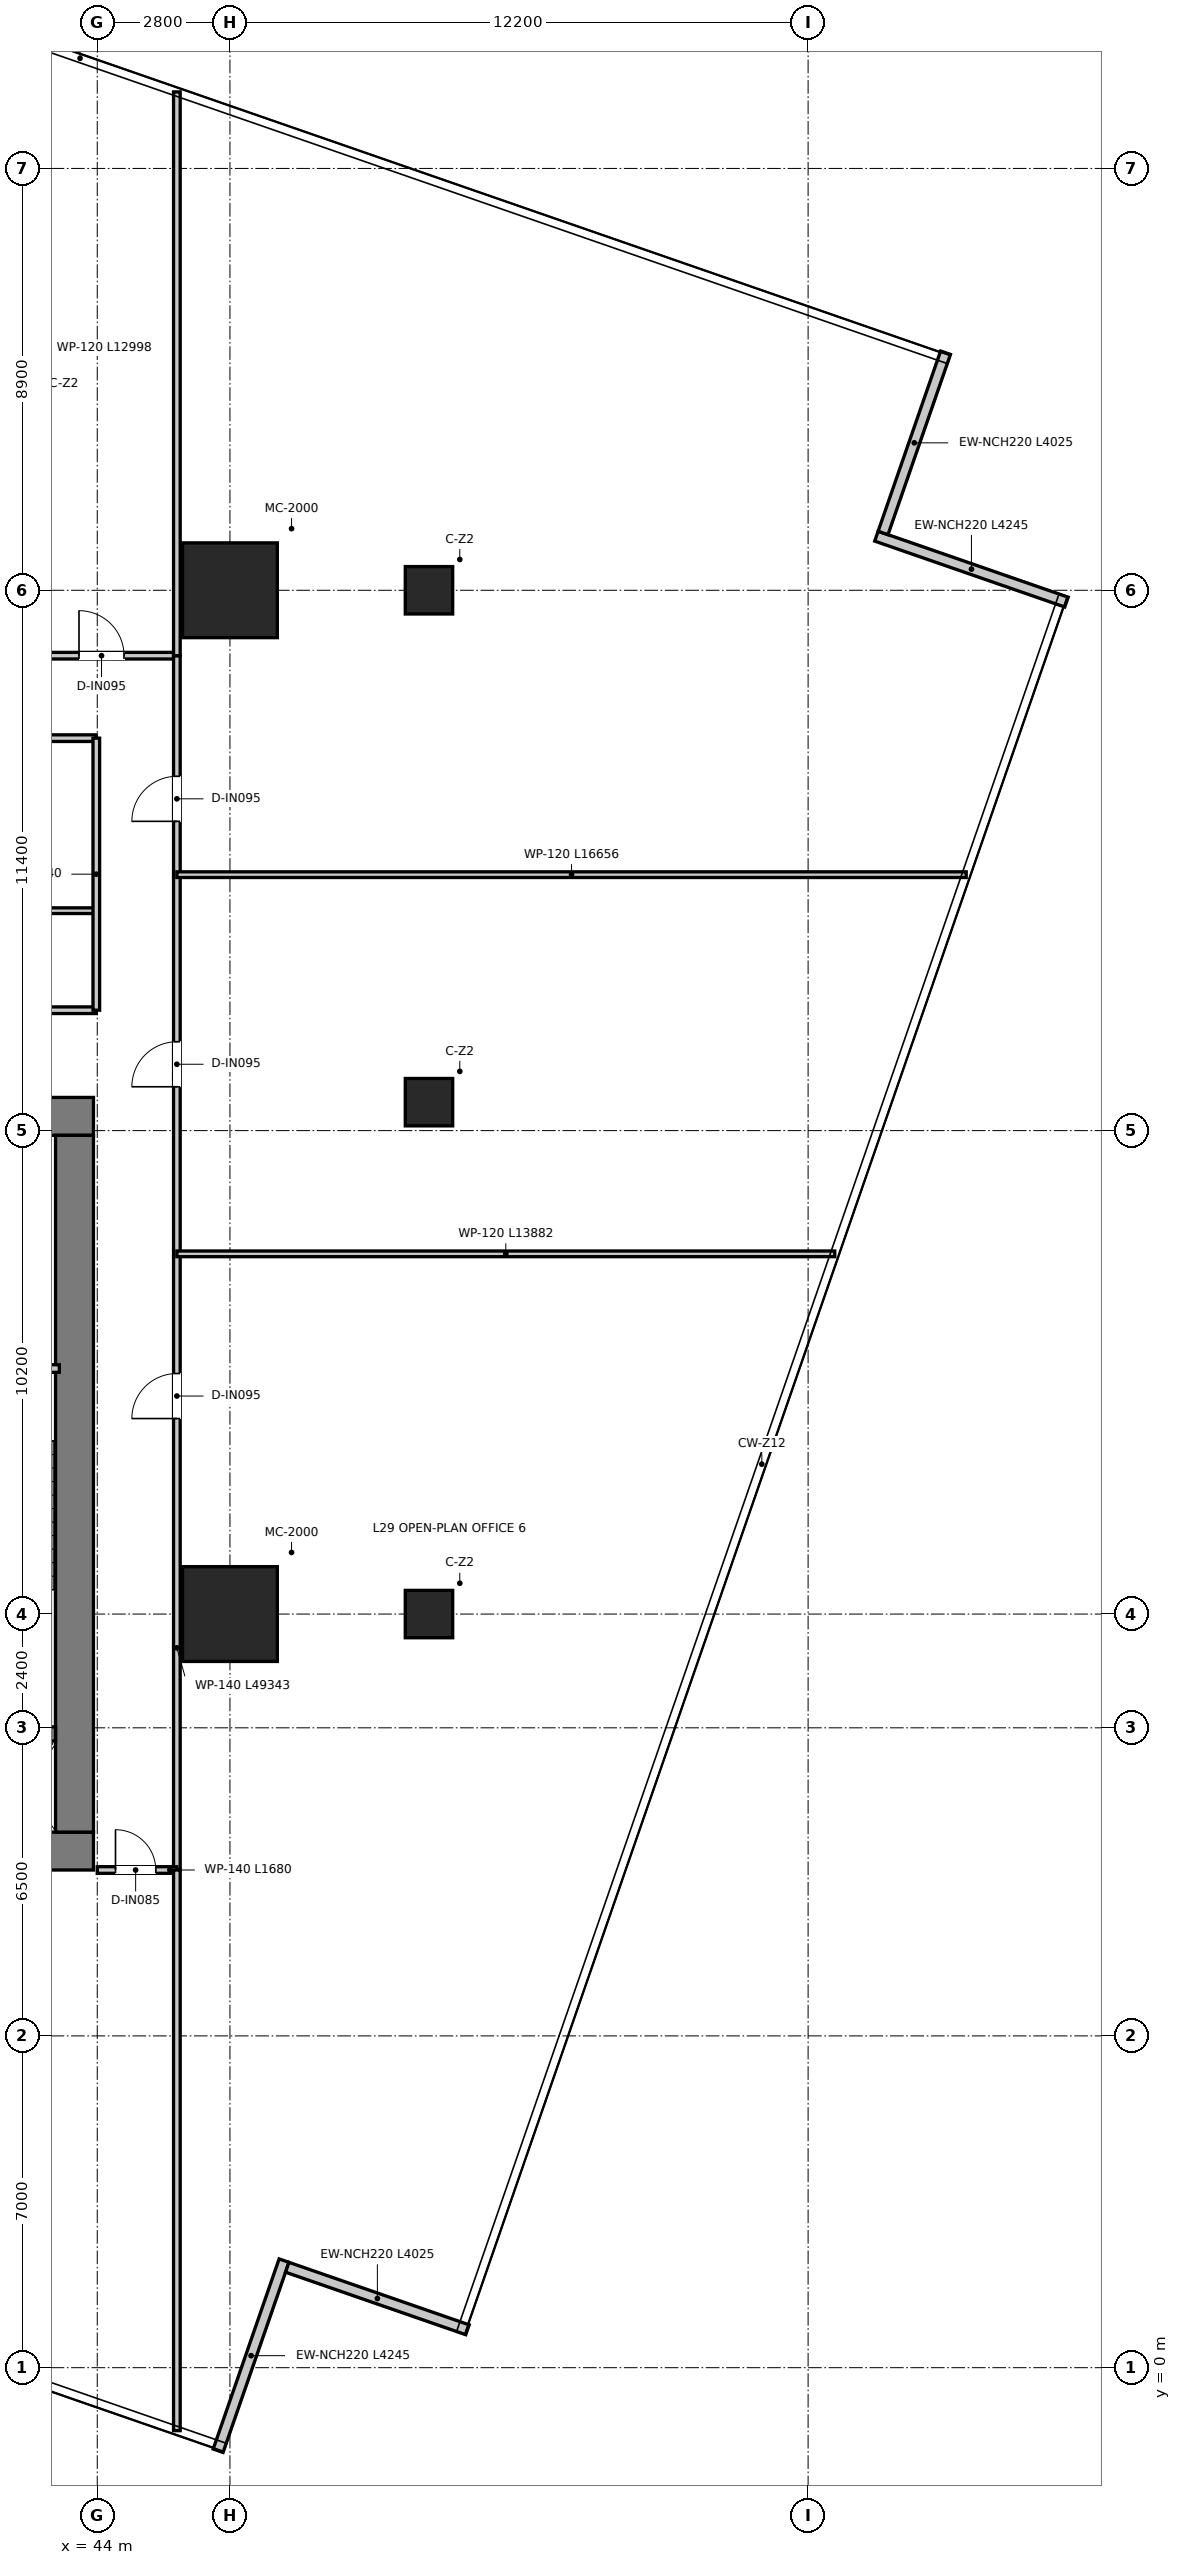
"""IFC4 building model, lengths in metres.
Left out: names, types, materials, properties, quantities, classifications, styles, units other than length and angle.
Written with IfcOpenShell. Run it as: python <this file> out.ifc"""

import sys

from ifc_helpers import new_model, si_unit, direction, frame, frame_2d, origin, origin_2d, place, context, subcontext, project, spatial, rectangle, extrude, source, transform, mapped, element, fill, save


model = new_model("IFC4")
c1 = context("Model", 3, precision=1e-05, world=origin(), true_north=direction((0.0, 1.0)))
c2 = subcontext(c1, "Body", "Model", "MODEL_VIEW")
j1 = project(units=[si_unit("LENGTHUNIT", "METRE"), si_unit("PLANEANGLEUNIT", "RADIAN")], contexts=[c1])
p1 = place(None, origin())
s1 = spatial("IfcSite", under=j1, at=p1, CompositionType="ELEMENT")
p2 = place(p1, origin())
s2 = spatial("IfcBuilding", under=s1, at=p2, CompositionType="ELEMENT")
p3 = place(p2, frame((0.0, 0.0, 121.65)))
s3 = spatial("IfcBuildingStorey", under=s2, at=p3, CompositionType="ELEMENT", Elevation=121.65)
p4 = place(p3, frame((28.08, 10.9, 0.0), z_axis=(0.0, 0.0, 1.0), x_axis=(1.0, 0.0, 0.0)))
e1 = element("IfcWall", 1, at=p4, inside=s3, PredefinedType="SHEAR", context=c2, shape_type="SweptSolid", body=[
    extrude(rectangle(XDim=15.84, YDim=0.8, at=frame_2d((7.92, 0.0))), origin(), (0.0, 0.0, 1.0), 3.95),
])
p5 = place(p3, frame((28.08, 26.4, 0.0), z_axis=(0.0, 0.0, 1.0), x_axis=(1.0, 0.0, 0.0)))
e2 = element("IfcWall", 2, at=p5, inside=s3, PredefinedType="SHEAR", context=c2, shape_type="SweptSolid", body=[
    extrude(rectangle(XDim=15.84, YDim=0.8, at=frame_2d((7.92, 0.0))), origin(), (0.0, 0.0, 1.0), 3.95),
])
p6 = place(p5, frame((7.22, 0.0, 0.0)))
e3 = element("IfcOpeningElement", 3, at=p6, cuts=e2, PredefinedType="OPENING", context=c2, shape_type="SweptSolid", body=[
    extrude(rectangle(XDim=1.4, YDim=2.2, at=frame_2d((0.7, 1.1))), frame((0.0, 0.41, 0.0), z_axis=(0.0, -1.0, 0.0), x_axis=(1.0, 0.0, 0.0)), (0.0, 0.0, 1.0), 0.82),
])
p7 = place(p5, frame((1.775, 0.0, 0.0)))
e4 = element("IfcOpeningElement", 4, at=p7, cuts=e2, PredefinedType="OPENING", context=c2, shape_type="SweptSolid", body=[
    extrude(rectangle(XDim=1.05, YDim=2.1, at=frame_2d((0.525, 1.05))), frame((0.0, 0.41, 0.0), z_axis=(0.0, -1.0, 0.0), x_axis=(1.0, 0.0, 0.0)), (0.0, 0.0, 1.0), 0.82),
])
p8 = place(p5, frame((13.015, 0.0, 0.0)))
e5 = element("IfcOpeningElement", 5, at=p8, cuts=e2, PredefinedType="OPENING", context=c2, shape_type="SweptSolid", body=[
    extrude(rectangle(XDim=1.05, YDim=2.1, at=frame_2d((0.525, 1.05))), frame((0.0, 0.41, 0.0), z_axis=(0.0, -1.0, 0.0), x_axis=(1.0, 0.0, 0.0)), (0.0, 0.0, 1.0), 0.82),
])
p9 = place(p3, frame((43.52, 11.3, 0.0), z_axis=(0.0, 0.0, 1.0), x_axis=(0.0, 1.0, 0.0)))
e6 = element("IfcWall", 6, at=p9, inside=s3, PredefinedType="SHEAR", context=c2, shape_type="SweptSolid", body=[
    extrude(rectangle(XDim=14.7, YDim=0.8, at=frame_2d((7.35, 0.0))), origin(), (0.0, 0.0, 1.0), 3.95),
])
p10 = place(p3, frame((40.02, 13.37, 0.0), z_axis=(0.0, 0.0, 1.0), x_axis=(1.0, 0.0, 0.0)))
e7 = element("IfcWall", 7, at=p10, inside=s3, PredefinedType="SHEAR", context=c2, shape_type="SweptSolid", body=[
    extrude(rectangle(XDim=3.1, YDim=0.3, at=frame_2d((1.55, 0.0))), origin(), (0.0, 0.0, 1.0), 3.95),
])
m1 = source(origin(), c2, "Body", "SweptSolid", [
    extrude(rectangle(XDim=2.0, YDim=2.0, at=origin_2d()), origin(), (0.0, 0.0, 1.0), 3.95),
])
for number, where, z_axis, x_axis in (
    (8, (46.8, 15.9, 0.0), (0.0, 0.0, 1.0), (1.0, 0.0, 0.0)),
    (9, (46.8, 37.5, 0.0), (0.0, 0.0, 1.0), (1.0, 0.0, 0.0)),
):
    element("IfcColumn", number, at=place(p3, frame(where, z_axis=z_axis, x_axis=x_axis)), inside=s3, PredefinedType="USERDEFINED", context=c2, shape_type="MappedRepresentation", body=[
        mapped(m1, transform((0.0, 0.0, 0.0), x_axis=(1.0, 0.0, 0.0), y_axis=(0.0, 1.0, 0.0), z_axis=(0.0, 0.0, 1.0), scale=1.0)),
    ])
m2 = source(origin(), c2, "Body", "SweptSolid", [
    extrude(rectangle(XDim=1.0, YDim=1.0, at=origin_2d()), origin(), (0.0, 0.0, 1.0), 3.95),
])
for number, where, z_axis, x_axis in (
    (10, (51.0, 37.5, 0.0), (0.0, 0.0, 1.0), (1.0, 0.0, 0.0)),
    (11, (51.0, 26.7, 0.0), (0.0, 0.0, 1.0), (1.0, 0.0, 0.0)),
    (12, (51.0, 15.9, 0.0), (0.0, 0.0, 1.0), (1.0, 0.0, 0.0)),
):
    element("IfcColumn", number, at=place(p3, frame(where, z_axis=z_axis, x_axis=x_axis)), inside=s3, PredefinedType="COLUMN", context=c2, shape_type="MappedRepresentation", body=[
        mapped(m2, transform((0.0, 0.0, 0.0), x_axis=(1.0, 0.0, 0.0), y_axis=(0.0, 1.0, 0.0), z_axis=(0.0, 0.0, 1.0), scale=1.0)),
    ])
p11 = place(p3, frame((46.551, -1.752, 0.0), z_axis=(0.0, 0.0, 1.0), x_axis=(0.327661647146, 0.944795133873, 0.0)))
e13 = element("IfcWall", 13, at=p11, inside=s3, PredefinedType="ELEMENTEDWALL", context=c2, shape_type="SweptSolid", body=[
    extrude(rectangle(XDim=4.245, YDim=0.22, at=frame_2d((2.123, 0.0))), origin(), (0.0, 0.0, 1.0), 3.67),
])
p12 = place(p3, frame((48.009, 2.119, 0.0), z_axis=(0.0, 0.0, 1.0), x_axis=(0.944811416539, -0.327614693164, 0.0)))
e14 = element("IfcWall", 14, at=p12, inside=s3, PredefinedType="ELEMENTEDWALL", context=c2, shape_type="SweptSolid", body=[
    extrude(rectangle(XDim=4.025, YDim=0.22, at=frame_2d((2.012, 0.0))), origin(), (0.0, 0.0, 1.0), 3.67),
])
p13 = place(p3, frame((64.452, 37.25, 0.0), z_axis=(0.0, 0.0, 1.0), x_axis=(-0.944801308279, 0.327643843028, 0.0)))
e15 = element("IfcWall", 15, at=p13, inside=s3, PredefinedType="ELEMENTEDWALL", context=c2, shape_type="SweptSolid", body=[
    extrude(rectangle(XDim=4.245, YDim=0.22, at=frame_2d((2.123, 0.0))), origin(), (0.0, 0.0, 1.0), 3.67),
])
p14 = place(p3, frame((60.581, 38.709, 0.0), z_axis=(0.0, 0.0, 1.0), x_axis=(0.327650062068, 0.94479915158, 0.0)))
e16 = element("IfcWall", 16, at=p14, inside=s3, PredefinedType="ELEMENTEDWALL", context=c2, shape_type="SweptSolid", body=[
    extrude(rectangle(XDim=4.025, YDim=0.22, at=frame_2d((2.013, 0.0))), origin(), (0.0, 0.0, 1.0), 3.67),
])
p15 = place(p3, frame((40.04, 21.08, 0.0), z_axis=(0.0, 0.0, 1.0), x_axis=(1.0, 0.0, 0.0)))
e17 = element("IfcWall", 17, at=p15, inside=s3, PredefinedType="PARTITIONING", context=c2, shape_type="SweptSolid", body=[
    extrude(rectangle(XDim=3.16, YDim=0.16, at=frame_2d((1.58, 0.0))), origin(), (0.0, 0.0, 1.0), 3.67),
])
p16 = place(p15, frame((1.055, 0.0, 0.0)))
e18 = element("IfcOpeningElement", 18, at=p16, cuts=e17, PredefinedType="OPENING", context=c2, shape_type="SweptSolid", body=[
    extrude(rectangle(XDim=1.05, YDim=2.1, at=frame_2d((0.525, 1.05))), frame((0.0, 0.09, 0.0), z_axis=(0.0, -1.0, 0.0), x_axis=(1.0, 0.0, 0.0)), (0.0, 0.0, 1.0), 0.18),
])
p17 = place(p3, frame((28.02, 28.64, 0.0), z_axis=(0.0, 0.0, 1.0), x_axis=(1.0, 0.0, 0.0)))
e19 = element("IfcWall", 19, at=p17, inside=s3, PredefinedType="PARTITIONING", context=c2, shape_type="SweptSolid", body=[
    extrude(rectangle(XDim=15.96, YDim=0.14, at=frame_2d((7.98, 0.0))), origin(), (0.0, 0.0, 1.0), 3.08),
])
p18 = place(p17, frame((7.455, 0.0, 0.0)))
e20 = element("IfcOpeningElement", 20, at=p18, cuts=e19, PredefinedType="OPENING", context=c2, shape_type="SweptSolid", body=[
    extrude(rectangle(XDim=1.05, YDim=2.15, at=frame_2d((0.525, 1.075))), frame((0.0, 0.08, 0.0), z_axis=(0.0, -1.0, 0.0), x_axis=(1.0, 0.0, 0.0)), (0.0, 0.0, 1.0), 0.16),
])
p19 = place(p3, frame((28.02, 30.74, 0.0), z_axis=(0.0, 0.0, 1.0), x_axis=(1.0, 0.0, 0.0)))
e21 = element("IfcWall", 21, at=p19, inside=s3, PredefinedType="PARTITIONING", context=c2, shape_type="SweptSolid", body=[
    extrude(rectangle(XDim=15.96, YDim=0.12, at=frame_2d((7.98, 0.0))), origin(), (0.0, 0.0, 1.0), 3.08),
])
p20 = place(p3, frame((28.02, 34.38, 0.0), z_axis=(0.0, 0.0, 1.0), x_axis=(1.0, 0.0, 0.0)))
e22 = element("IfcWall", 22, at=p20, inside=s3, PredefinedType="PARTITIONING", context=c2, shape_type="SweptSolid", body=[
    extrude(rectangle(XDim=15.96, YDim=0.14, at=frame_2d((7.98, 0.0))), origin(), (0.0, 0.0, 1.0), 3.08),
])
p21 = place(p20, frame((1.13, 0.0, 0.0)))
e23 = element("IfcOpeningElement", 23, at=p21, cuts=e22, PredefinedType="OPENING", context=c2, shape_type="SweptSolid", body=[
    extrude(rectangle(XDim=0.9, YDim=2.1, at=frame_2d((0.45, 1.05))), frame((0.0, 0.08, 0.0), z_axis=(0.0, -1.0, 0.0), x_axis=(1.0, 0.0, 0.0)), (0.0, 0.0, 1.0), 0.16),
])
p22 = place(p20, frame((4.33, 0.0, 0.0)))
e24 = element("IfcOpeningElement", 24, at=p22, cuts=e22, PredefinedType="OPENING", context=c2, shape_type="SweptSolid", body=[
    extrude(rectangle(XDim=0.9, YDim=2.1, at=frame_2d((0.45, 1.05))), frame((0.0, 0.08, 0.0), z_axis=(0.0, -1.0, 0.0), x_axis=(1.0, 0.0, 0.0)), (0.0, 0.0, 1.0), 0.16),
])
p23 = place(p20, frame((7.355, 0.0, 0.0)))
e25 = element("IfcOpeningElement", 25, at=p23, cuts=e22, PredefinedType="OPENING", context=c2, shape_type="SweptSolid", body=[
    extrude(rectangle(XDim=0.95, YDim=2.1, at=frame_2d((0.475, 1.05))), frame((0.0, 0.08, 0.0), z_axis=(0.0, -1.0, 0.0), x_axis=(1.0, 0.0, 0.0)), (0.0, 0.0, 1.0), 0.16),
])
p24 = place(p20, frame((12.23, 0.0, 0.0)))
e26 = element("IfcOpeningElement", 26, at=p24, cuts=e22, PredefinedType="OPENING", context=c2, shape_type="SweptSolid", body=[
    extrude(rectangle(XDim=0.95, YDim=2.1, at=frame_2d((0.475, 1.05))), frame((0.0, 0.08, 0.0), z_axis=(0.0, -1.0, 0.0), x_axis=(1.0, 0.0, 0.0)), (0.0, 0.0, 1.0), 0.16),
])
p25 = place(p3, frame((43.98, 28.64, 0.0), z_axis=(0.0, 0.0, 1.0), x_axis=(0.0, 1.0, 0.0)))
e27 = element("IfcWall", 27, at=p25, inside=s3, PredefinedType="PARTITIONING", context=c2, shape_type="SweptSolid", body=[
    extrude(rectangle(XDim=5.74, YDim=0.14, at=frame_2d((2.87, 0.0))), origin(), (0.0, 0.0, 1.0), 3.27),
])
p26 = place(p3, frame((26.32, 36.12, 0.0), z_axis=(0.0, 0.0, 1.0), x_axis=(1.0, 0.0, 0.0)))
e28 = element("IfcWall", 28, at=p26, inside=s3, PredefinedType="PARTITIONING", context=c2, shape_type="SweptSolid", body=[
    extrude(rectangle(XDim=19.36, YDim=0.14, at=frame_2d((9.68, 0.0))), origin(), (0.0, 0.0, 1.0), 3.08),
])
p27 = place(p26, frame((1.615, 0.0, 0.0)))
e29 = element("IfcOpeningElement", 29, at=p27, cuts=e28, PredefinedType="OPENING", context=c2, shape_type="SweptSolid", body=[
    extrude(rectangle(XDim=0.95, YDim=2.1, at=frame_2d((0.475, 1.05))), frame((0.0, 0.08, 0.0), z_axis=(0.0, -1.0, 0.0), x_axis=(1.0, 0.0, 0.0)), (0.0, 0.0, 1.0), 0.16),
])
p28 = place(p26, frame((6.705, 0.0, 0.0)))
e30 = element("IfcOpeningElement", 30, at=p28, cuts=e28, PredefinedType="OPENING", context=c2, shape_type="SweptSolid", body=[
    extrude(rectangle(XDim=0.95, YDim=2.1, at=frame_2d((0.475, 1.05))), frame((0.0, 0.08, 0.0), z_axis=(0.0, -1.0, 0.0), x_axis=(1.0, 0.0, 0.0)), (0.0, 0.0, 1.0), 0.16),
])
p29 = place(p26, frame((12.705, 0.0, 0.0)))
e31 = element("IfcOpeningElement", 31, at=p29, cuts=e28, PredefinedType="OPENING", context=c2, shape_type="SweptSolid", body=[
    extrude(rectangle(XDim=0.95, YDim=2.1, at=frame_2d((0.475, 1.05))), frame((0.0, 0.08, 0.0), z_axis=(0.0, -1.0, 0.0), x_axis=(1.0, 0.0, 0.0)), (0.0, 0.0, 1.0), 0.16),
])
p30 = place(p26, frame((17.295, 0.0, 0.0)))
e32 = element("IfcOpeningElement", 32, at=p30, cuts=e28, PredefinedType="OPENING", context=c2, shape_type="SweptSolid", body=[
    extrude(rectangle(XDim=0.95, YDim=2.1, at=frame_2d((0.475, 1.05))), frame((0.0, 0.08, 0.0), z_axis=(0.0, -1.0, 0.0), x_axis=(1.0, 0.0, 0.0)), (0.0, 0.0, 1.0), 0.16),
])
p31 = place(p3, frame((45.68, 10.5, 0.0), z_axis=(0.0, 0.0, 1.0), x_axis=(0.0, 1.0, 0.0)))
e33 = element("IfcWall", 33, at=p31, inside=s3, PredefinedType="PARTITIONING", context=c2, shape_type="SweptSolid", body=[
    extrude(rectangle(XDim=25.62, YDim=0.14, at=frame_2d((12.81, 0.0))), origin(), (0.0, 0.0, 1.0), 2.97),
])
p32 = place(p31, frame((9.525, 0.0, 0.0)))
e34 = element("IfcOpeningElement", 34, at=p32, cuts=e33, PredefinedType="OPENING", context=c2, shape_type="SweptSolid", body=[
    extrude(rectangle(XDim=0.95, YDim=2.1, at=frame_2d((0.475, 1.05))), frame((0.0, 0.08, 0.0), z_axis=(0.0, -1.0, 0.0), x_axis=(1.0, 0.0, 0.0)), (0.0, 0.0, 1.0), 0.16),
])
p33 = place(p31, frame((16.525, 0.0, 0.0)))
e35 = element("IfcOpeningElement", 35, at=p33, cuts=e33, PredefinedType="OPENING", context=c2, shape_type="SweptSolid", body=[
    extrude(rectangle(XDim=0.95, YDim=2.1, at=frame_2d((0.475, 1.05))), frame((0.0, 0.08, 0.0), z_axis=(0.0, -1.0, 0.0), x_axis=(1.0, 0.0, 0.0)), (0.0, 0.0, 1.0), 0.16),
])
p34 = place(p31, frame((22.125, 0.0, 0.0)))
e36 = element("IfcOpeningElement", 36, at=p34, cuts=e33, PredefinedType="OPENING", context=c2, shape_type="SweptSolid", body=[
    extrude(rectangle(XDim=0.95, YDim=2.1, at=frame_2d((0.475, 1.05))), frame((0.0, 0.08, 0.0), z_axis=(0.0, -1.0, 0.0), x_axis=(1.0, 0.0, 0.0)), (0.0, 0.0, 1.0), 0.16),
])
p35 = place(p3, frame((44.0, 10.5, 0.0), z_axis=(0.0, 0.0, 1.0), x_axis=(1.0, 0.0, 0.0)))
e37 = element("IfcWall", 37, at=p35, inside=s3, PredefinedType="PARTITIONING", context=c2, shape_type="SweptSolid", body=[
    extrude(rectangle(XDim=1.68, YDim=0.14, at=frame_2d((0.84, 0.0))), origin(), (0.0, 0.0, 1.0), 3.67),
])
p36 = place(p35, frame((0.385, 0.0, 0.0)))
e38 = element("IfcOpeningElement", 38, at=p36, cuts=e37, PredefinedType="OPENING", context=c2, shape_type="SweptSolid", body=[
    extrude(rectangle(XDim=0.85, YDim=2.1, at=frame_2d((0.425, 1.05))), frame((0.0, 0.08, 0.0), z_axis=(0.0, -1.0, 0.0), x_axis=(1.0, 0.0, 0.0)), (0.0, 0.0, 1.0), 0.16),
])
p37 = place(p3, frame((45.68, 36.12, 0.0), z_axis=(0.0, 0.0, 1.0), x_axis=(0.0, 1.0, 0.0)))
e39 = element("IfcWall", 39, at=p37, inside=s3, PredefinedType="PARTITIONING", context=c2, shape_type="SweptSolid", body=[
    extrude(rectangle(XDim=11.895, YDim=0.14, at=frame_2d((5.947, 0.0))), origin(), (0.0, 0.0, 1.0), 2.97),
])
p38 = place(p3, frame((45.68, -1.329, 0.0), z_axis=(0.0, 0.0, 1.0), x_axis=(0.0, 1.0, 0.0)))
e40 = element("IfcWall", 40, at=p38, inside=s3, PredefinedType="PARTITIONING", context=c2, shape_type="SweptSolid", body=[
    extrude(rectangle(XDim=11.829, YDim=0.14, at=frame_2d((5.914, 0.0))), origin(), (0.0, 0.0, 1.0), 3.67),
])
p39 = place(p3, frame((45.68, 23.5, 0.0), z_axis=(0.0, 0.0, 1.0), x_axis=(1.0, 0.0, 0.0)))
e41 = element("IfcWall", 41, at=p39, inside=s3, PredefinedType="PARTITIONING", context=c2, shape_type="SweptSolid", body=[
    extrude(rectangle(XDim=13.882, YDim=0.12, at=frame_2d((6.941, 0.0))), origin(), (0.0, 0.0, 1.0), 2.97),
])
p40 = place(p3, frame((45.68, 31.5, 0.0), z_axis=(0.0, 0.0, 1.0), x_axis=(1.0, 0.0, 0.0)))
e42 = element("IfcWall", 42, at=p40, inside=s3, PredefinedType="PARTITIONING", context=c2, shape_type="SweptSolid", body=[
    extrude(rectangle(XDim=16.656, YDim=0.12, at=frame_2d((8.328, 0.0))), origin(), (0.0, 0.0, 1.0), 2.97),
])
p41 = place(p30, origin())
e43 = element("IfcDoor", 43, at=p41, inside=s3, OperationType="SINGLE_SWING_LEFT", PredefinedType="DOOR", context=c2, shape_type="SweptSolid", body=[
    extrude(rectangle(XDim=0.95, YDim=2.1, at=frame_2d((0.475, 1.05))), frame((0.0, 0.025, 0.0), z_axis=(0.0, -1.0, 0.0), x_axis=(1.0, 0.0, 0.0)), (0.0, 0.0, 1.0), 0.05),
])
fill(e32, e43)
p42 = place(p32, origin())
e44 = element("IfcDoor", 44, at=p42, inside=s3, OperationType="SINGLE_SWING_LEFT", PredefinedType="DOOR", context=c2, shape_type="SweptSolid", body=[
    extrude(rectangle(XDim=0.95, YDim=2.1, at=frame_2d((0.475, 1.05))), frame((0.0, 0.025, 0.0), z_axis=(0.0, -1.0, 0.0), x_axis=(1.0, 0.0, 0.0)), (0.0, 0.0, 1.0), 0.05),
])
fill(e34, e44)
p43 = place(p33, origin())
e45 = element("IfcDoor", 45, at=p43, inside=s3, OperationType="SINGLE_SWING_LEFT", PredefinedType="DOOR", context=c2, shape_type="SweptSolid", body=[
    extrude(rectangle(XDim=0.95, YDim=2.1, at=frame_2d((0.475, 1.05))), frame((0.0, 0.025, 0.0), z_axis=(0.0, -1.0, 0.0), x_axis=(1.0, 0.0, 0.0)), (0.0, 0.0, 1.0), 0.05),
])
fill(e35, e45)
p44 = place(p34, origin())
e46 = element("IfcDoor", 46, at=p44, inside=s3, OperationType="SINGLE_SWING_LEFT", PredefinedType="DOOR", context=c2, shape_type="SweptSolid", body=[
    extrude(rectangle(XDim=0.95, YDim=2.1, at=frame_2d((0.475, 1.05))), frame((0.0, 0.025, 0.0), z_axis=(0.0, -1.0, 0.0), x_axis=(1.0, 0.0, 0.0)), (0.0, 0.0, 1.0), 0.05),
])
fill(e36, e46)
p45 = place(p36, origin())
e47 = element("IfcDoor", 47, at=p45, inside=s3, OperationType="SINGLE_SWING_LEFT", PredefinedType="DOOR", context=c2, shape_type="SweptSolid", body=[
    extrude(rectangle(XDim=0.85, YDim=2.1, at=frame_2d((0.425, 1.05))), frame((0.0, 0.025, 0.0), z_axis=(0.0, -1.0, 0.0), x_axis=(1.0, 0.0, 0.0)), (0.0, 0.0, 1.0), 0.05),
])
fill(e38, e47)
save(model, sys.argv[1])
